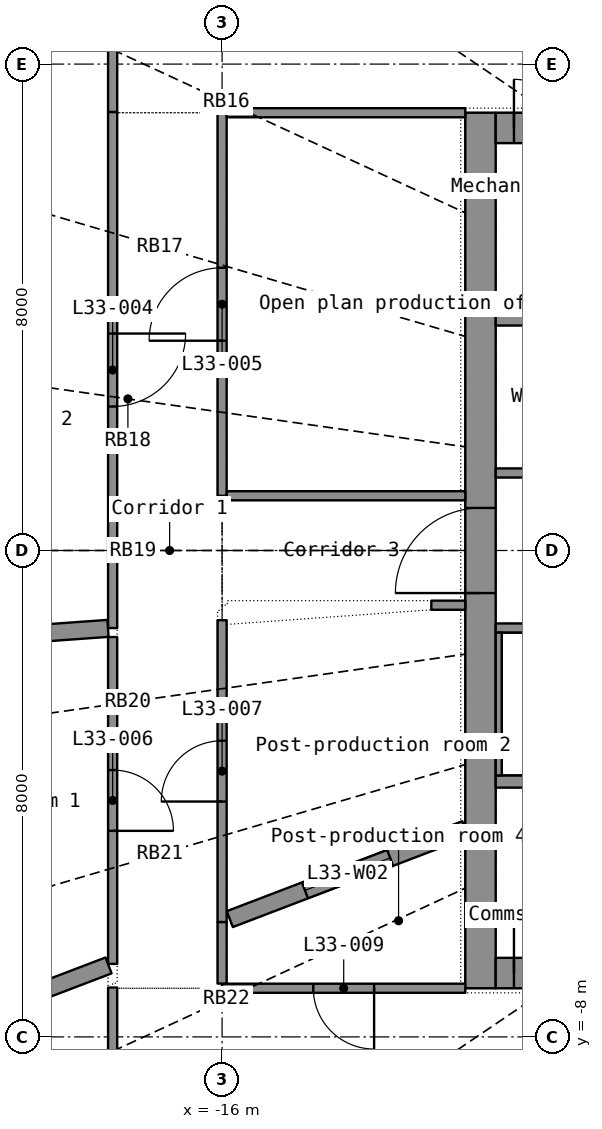
"""IFC4 building model, lengths in metres.
Left out: names, types, materials, properties, quantities, classifications, styles, units other than length and angle.
Written with IfcOpenShell. Run it as: python <this file> out.ifc"""

import sys

from ifc_helpers import new_model, si_unit, direction, frame, frame_2d, origin, place, context, subcontext, project, spatial, rectangle, extrude, element, fill, save


model = new_model("IFC4")
c1 = context("Model", 3, precision=1e-05, world=origin(), true_north=direction((0.0, 1.0)))
c2 = subcontext(c1, "Body", "Model", "MODEL_VIEW")
j1 = project(units=[si_unit("LENGTHUNIT", "METRE"), si_unit("PLANEANGLEUNIT", "RADIAN")], contexts=[c1])
p1 = place(None, origin())
s1 = spatial("IfcSite", under=j1, at=p1, CompositionType="ELEMENT")
p2 = place(p1, origin())
s2 = spatial("IfcBuilding", under=s1, at=p2, CompositionType="ELEMENT")
p3 = place(p2, frame((0.0, 0.0, 137.8)))
s3 = spatial("IfcBuildingStorey", under=s2, at=p3, CompositionType="ELEMENT", Elevation=137.8)
p4 = place(p3, frame((-11.75, -7.2, 0.0), z_axis=(0.0, 0.0, 1.0), x_axis=(0.0, 1.0, 0.0)))
e1 = element("IfcWall", 1, at=p4, inside=s3, PredefinedType="SHEAR", context=c2, shape_type="SweptSolid", body=[
    extrude(rectangle(XDim=14.4, YDim=0.5, at=frame_2d((7.2, 0.0))), origin(), (0.0, 0.0, 1.0), 3.3),
])
p5 = place(p4, frame((6.5, 0.0, 0.0)))
e2 = element("IfcOpeningElement", 2, at=p5, cuts=e1, PredefinedType="OPENING", context=c2, shape_type="SweptSolid", body=[
    extrude(rectangle(XDim=1.4, YDim=2.2, at=frame_2d((0.7, 1.1))), frame((0.0, 0.26, 0.0), z_axis=(0.0, -1.0, 0.0), x_axis=(1.0, 0.0, 0.0)), (0.0, 0.0, 1.0), 0.52),
])
p6 = place(p3, frame((-11.5, -6.95, 0.0), z_axis=(0.0, 0.0, 1.0), x_axis=(1.0, 0.0, 0.0)))
e3 = element("IfcWall", 3, at=p6, inside=s3, PredefinedType="SHEAR", context=c2, shape_type="SweptSolid", body=[
    extrude(rectangle(XDim=23.0, YDim=0.5, at=frame_2d((11.5, 0.0))), origin(), (0.0, 0.0, 1.0), 3.3),
])
p7 = place(p6, frame((1.95, 0.0, 0.0)))
e4 = element("IfcOpeningElement", 4, at=p7, cuts=e3, PredefinedType="OPENING", context=c2, shape_type="SweptSolid", body=[
    extrude(rectangle(XDim=1.1, YDim=2.2, at=frame_2d((0.55, 1.1))), frame((0.0, 0.26, 0.0), z_axis=(0.0, -1.0, 0.0), x_axis=(1.0, 0.0, 0.0)), (0.0, 0.0, 1.0), 0.52),
])
p8 = place(p6, frame((3.95, 0.0, 0.0)))
e5 = element("IfcOpeningElement", 5, at=p8, cuts=e3, PredefinedType="OPENING", context=c2, shape_type="SweptSolid", body=[
    extrude(rectangle(XDim=1.1, YDim=2.2, at=frame_2d((0.55, 1.1))), frame((0.0, 0.26, 0.0), z_axis=(0.0, -1.0, 0.0), x_axis=(1.0, 0.0, 0.0)), (0.0, 0.0, 1.0), 0.52),
])
p9 = place(p6, frame((5.95, 0.0, 0.0)))
e6 = element("IfcOpeningElement", 6, at=p9, cuts=e3, PredefinedType="OPENING", context=c2, shape_type="SweptSolid", body=[
    extrude(rectangle(XDim=1.1, YDim=2.2, at=frame_2d((0.55, 1.1))), frame((0.0, 0.26, 0.0), z_axis=(0.0, -1.0, 0.0), x_axis=(1.0, 0.0, 0.0)), (0.0, 0.0, 1.0), 0.52),
])
p10 = place(p6, frame((7.95, 0.0, 0.0)))
e7 = element("IfcOpeningElement", 7, at=p10, cuts=e3, PredefinedType="OPENING", context=c2, shape_type="SweptSolid", body=[
    extrude(rectangle(XDim=1.1, YDim=2.2, at=frame_2d((0.55, 1.1))), frame((0.0, 0.26, 0.0), z_axis=(0.0, -1.0, 0.0), x_axis=(1.0, 0.0, 0.0)), (0.0, 0.0, 1.0), 0.52),
])
p11 = place(p6, frame((9.95, 0.0, 0.0)))
e8 = element("IfcOpeningElement", 8, at=p11, cuts=e3, PredefinedType="OPENING", context=c2, shape_type="SweptSolid", body=[
    extrude(rectangle(XDim=1.1, YDim=2.2, at=frame_2d((0.55, 1.1))), frame((0.0, 0.26, 0.0), z_axis=(0.0, -1.0, 0.0), x_axis=(1.0, 0.0, 0.0)), (0.0, 0.0, 1.0), 0.52),
])
p12 = place(p6, frame((11.95, 0.0, 0.0)))
e9 = element("IfcOpeningElement", 9, at=p12, cuts=e3, PredefinedType="OPENING", context=c2, shape_type="SweptSolid", body=[
    extrude(rectangle(XDim=1.1, YDim=2.2, at=frame_2d((0.55, 1.1))), frame((0.0, 0.26, 0.0), z_axis=(0.0, -1.0, 0.0), x_axis=(1.0, 0.0, 0.0)), (0.0, 0.0, 1.0), 0.52),
])
p13 = place(p6, frame((13.95, 0.0, 0.0)))
e10 = element("IfcOpeningElement", 10, at=p13, cuts=e3, PredefinedType="OPENING", context=c2, shape_type="SweptSolid", body=[
    extrude(rectangle(XDim=1.1, YDim=2.2, at=frame_2d((0.55, 1.1))), frame((0.0, 0.26, 0.0), z_axis=(0.0, -1.0, 0.0), x_axis=(1.0, 0.0, 0.0)), (0.0, 0.0, 1.0), 0.52),
])
p14 = place(p6, frame((15.95, 0.0, 0.0)))
e11 = element("IfcOpeningElement", 11, at=p14, cuts=e3, PredefinedType="OPENING", context=c2, shape_type="SweptSolid", body=[
    extrude(rectangle(XDim=1.1, YDim=2.2, at=frame_2d((0.55, 1.1))), frame((0.0, 0.26, 0.0), z_axis=(0.0, -1.0, 0.0), x_axis=(1.0, 0.0, 0.0)), (0.0, 0.0, 1.0), 0.52),
])
p15 = place(p6, frame((19.95, 0.0, 0.0)))
e12 = element("IfcOpeningElement", 12, at=p15, cuts=e3, PredefinedType="OPENING", context=c2, shape_type="SweptSolid", body=[
    extrude(rectangle(XDim=1.1, YDim=2.2, at=frame_2d((0.55, 1.1))), frame((0.0, 0.26, 0.0), z_axis=(0.0, -1.0, 0.0), x_axis=(1.0, 0.0, 0.0)), (0.0, 0.0, 1.0), 0.52),
])
p16 = place(p6, frame((0.3, 0.0, 0.0)))
e13 = element("IfcOpeningElement", 13, at=p16, cuts=e3, PredefinedType="OPENING", context=c2, shape_type="SweptSolid", body=[
    extrude(rectangle(XDim=0.8, YDim=2.05, at=frame_2d((0.4, 1.025))), frame((0.0, 0.26, 0.0), z_axis=(0.0, -1.0, 0.0), x_axis=(1.0, 0.0, 0.0)), (0.0, 0.0, 1.0), 0.52),
])
p17 = place(p6, frame((21.9, 0.0, 0.0)))
e14 = element("IfcOpeningElement", 14, at=p17, cuts=e3, PredefinedType="OPENING", context=c2, shape_type="SweptSolid", body=[
    extrude(rectangle(XDim=0.8, YDim=2.05, at=frame_2d((0.4, 1.025))), frame((0.0, 0.26, 0.0), z_axis=(0.0, -1.0, 0.0), x_axis=(1.0, 0.0, 0.0)), (0.0, 0.0, 1.0), 0.52),
])
p18 = place(p3, frame((-11.5, 6.95, 0.0), z_axis=(0.0, 0.0, 1.0), x_axis=(1.0, 0.0, 0.0)))
e15 = element("IfcWall", 15, at=p18, inside=s3, PredefinedType="SHEAR", context=c2, shape_type="SweptSolid", body=[
    extrude(rectangle(XDim=23.0, YDim=0.5, at=frame_2d((11.5, 0.0))), origin(), (0.0, 0.0, 1.0), 3.3),
])
p19 = place(p18, frame((1.95, 0.0, 0.0)))
e16 = element("IfcOpeningElement", 16, at=p19, cuts=e15, PredefinedType="OPENING", context=c2, shape_type="SweptSolid", body=[
    extrude(rectangle(XDim=1.1, YDim=2.2, at=frame_2d((0.55, 1.1))), frame((0.0, 0.26, 0.0), z_axis=(0.0, -1.0, 0.0), x_axis=(1.0, 0.0, 0.0)), (0.0, 0.0, 1.0), 0.52),
])
p20 = place(p18, frame((10.05, 0.0, 0.0)))
e17 = element("IfcOpeningElement", 17, at=p20, cuts=e15, PredefinedType="OPENING", context=c2, shape_type="SweptSolid", body=[
    extrude(rectangle(XDim=0.9, YDim=2.1, at=frame_2d((0.45, 1.05))), frame((0.0, 0.26, 0.0), z_axis=(0.0, -1.0, 0.0), x_axis=(1.0, 0.0, 0.0)), (0.0, 0.0, 1.0), 0.52),
])
p21 = place(p18, frame((18.05, 0.0, 0.0)))
e18 = element("IfcOpeningElement", 18, at=p21, cuts=e15, PredefinedType="OPENING", context=c2, shape_type="SweptSolid", body=[
    extrude(rectangle(XDim=0.9, YDim=2.1, at=frame_2d((0.45, 1.05))), frame((0.0, 0.26, 0.0), z_axis=(0.0, -1.0, 0.0), x_axis=(1.0, 0.0, 0.0)), (0.0, 0.0, 1.0), 0.52),
])
p22 = place(p18, frame((0.3, 0.0, 0.0)))
e19 = element("IfcOpeningElement", 19, at=p22, cuts=e15, PredefinedType="OPENING", context=c2, shape_type="SweptSolid", body=[
    extrude(rectangle(XDim=0.8, YDim=2.05, at=frame_2d((0.4, 1.025))), frame((0.0, 0.26, 0.0), z_axis=(0.0, -1.0, 0.0), x_axis=(1.0, 0.0, 0.0)), (0.0, 0.0, 1.0), 0.52),
])
p23 = place(p18, frame((21.9, 0.0, 0.0)))
e20 = element("IfcOpeningElement", 20, at=p23, cuts=e15, PredefinedType="OPENING", context=c2, shape_type="SweptSolid", body=[
    extrude(rectangle(XDim=0.8, YDim=2.05, at=frame_2d((0.4, 1.025))), frame((0.0, 0.26, 0.0), z_axis=(0.0, -1.0, 0.0), x_axis=(1.0, 0.0, 0.0)), (0.0, 0.0, 1.0), 0.52),
])
for number, where, z_axis, x_axis in (
    (21, (-11.5, -3.8, 0.0), (0.0, 0.0, 1.0), (1.0, 0.0, 0.0)),
    (22, (-11.5, 3.8, 0.0), (0.0, 0.0, 1.0), (1.0, 0.0, 0.0)),
):
    element("IfcWall", number, at=place(p3, frame(where, z_axis=z_axis, x_axis=x_axis)), inside=s3, PredefinedType="SHEAR", context=c2, shape_type="SweptSolid", body=[
        extrude(rectangle(XDim=23.0, YDim=0.2, at=frame_2d((11.5, 0.0))), origin(), (0.0, 0.0, 1.0), 3.3),
    ])
p24 = place(p3, frame((-11.5, -1.275, 0.0), z_axis=(0.0, 0.0, 1.0), x_axis=(1.0, 0.0, 0.0)))
e23 = element("IfcWall", 23, at=p24, inside=s3, PredefinedType="SHEAR", context=c2, shape_type="SweptSolid", body=[
    extrude(rectangle(XDim=8.5, YDim=0.15, at=frame_2d((4.25, 0.0))), origin(), (0.0, 0.0, 1.0), 3.3),
])
p25 = place(p24, frame((5.35, 0.0, 0.0)))
e24 = element("IfcOpeningElement", 24, at=p25, cuts=e23, PredefinedType="OPENING", context=c2, shape_type="SweptSolid", body=[
    extrude(rectangle(XDim=1.1, YDim=2.15, at=frame_2d((0.55, 1.075))), frame((0.0, 0.085, 0.0), z_axis=(0.0, -1.0, 0.0), x_axis=(1.0, 0.0, 0.0)), (0.0, 0.0, 1.0), 0.17),
])
p26 = place(p24, frame((7.15, 0.0, 0.0)))
e25 = element("IfcOpeningElement", 25, at=p26, cuts=e23, PredefinedType="OPENING", context=c2, shape_type="SweptSolid", body=[
    extrude(rectangle(XDim=0.9, YDim=2.1, at=frame_2d((0.45, 1.05))), frame((0.0, 0.085, 0.0), z_axis=(0.0, -1.0, 0.0), x_axis=(1.0, 0.0, 0.0)), (0.0, 0.0, 1.0), 0.17),
])
p27 = place(p3, frame((-11.5, 1.275, 0.0), z_axis=(0.0, 0.0, 1.0), x_axis=(1.0, 0.0, 0.0)))
e26 = element("IfcWall", 26, at=p27, inside=s3, PredefinedType="PARTITIONING", context=c2, shape_type="SweptSolid", body=[
    extrude(rectangle(XDim=8.5, YDim=0.15, at=frame_2d((4.25, 0.0))), origin(), (0.0, 0.0, 1.0), 3.3),
])
p28 = place(p27, frame((0.782, 0.0, 0.0)))
e27 = element("IfcOpeningElement", 27, at=p28, cuts=e26, PredefinedType="OPENING", context=c2, shape_type="SweptSolid", body=[
    extrude(rectangle(XDim=0.85, YDim=2.1, at=frame_2d((0.425, 1.05))), frame((0.0, 0.085, 0.0), z_axis=(0.0, -1.0, 0.0), x_axis=(1.0, 0.0, 0.0)), (0.0, 0.0, 1.0), 0.17),
])
p29 = place(p27, frame((3.347, 0.0, 0.0)))
e28 = element("IfcOpeningElement", 28, at=p29, cuts=e26, PredefinedType="OPENING", context=c2, shape_type="SweptSolid", body=[
    extrude(rectangle(XDim=0.85, YDim=2.1, at=frame_2d((0.425, 1.05))), frame((0.0, 0.085, 0.0), z_axis=(0.0, -1.0, 0.0), x_axis=(1.0, 0.0, 0.0)), (0.0, 0.0, 1.0), 0.17),
])
p30 = place(p27, frame((5.485, 0.0, 0.0)))
e29 = element("IfcOpeningElement", 29, at=p30, cuts=e26, PredefinedType="OPENING", context=c2, shape_type="SweptSolid", body=[
    extrude(rectangle(XDim=0.9, YDim=2.1, at=frame_2d((0.45, 1.05))), frame((0.0, 0.085, 0.0), z_axis=(0.0, -1.0, 0.0), x_axis=(1.0, 0.0, 0.0)), (0.0, 0.0, 1.0), 0.17),
])
p31 = place(p27, frame((7.245, 0.0, 0.0)))
e30 = element("IfcOpeningElement", 30, at=p31, cuts=e26, PredefinedType="OPENING", context=c2, shape_type="SweptSolid", body=[
    extrude(rectangle(XDim=0.9, YDim=2.1, at=frame_2d((0.45, 1.05))), frame((0.0, 0.085, 0.0), z_axis=(0.0, -1.0, 0.0), x_axis=(1.0, 0.0, 0.0)), (0.0, 0.0, 1.0), 0.17),
])
p32 = place(p3, frame((-11.45, -3.7, 0.0), z_axis=(0.0, 0.0, 1.0), x_axis=(0.0, 1.0, 0.0)))
e31 = element("IfcWall", 31, at=p32, inside=s3, PredefinedType="SHEAR", context=c2, shape_type="SweptSolid", body=[
    extrude(rectangle(XDim=2.35, YDim=0.1, at=frame_2d((1.175, 0.0))), origin(), (0.0, 0.0, 1.0), 3.3),
])
p33 = place(p3, frame((-17.8, 7.212, 0.0), z_axis=(0.0, 0.0, 1.0), x_axis=(0.0, -1.0, 0.0)))
e32 = element("IfcWall", 32, at=p33, inside=s3, PredefinedType="PARTITIONING", context=c2, shape_type="SweptSolid", body=[
    extrude(rectangle(XDim=8.488, YDim=0.15, at=frame_2d((4.244, 0.0))), origin(), (0.0, 0.0, 1.0), 2.4),
])
p34 = place(p33, frame((3.644, 0.0, 0.0)))
e33 = element("IfcOpeningElement", 33, at=p34, cuts=e32, PredefinedType="OPENING", context=c2, shape_type="SweptSolid", body=[
    extrude(rectangle(XDim=1.2, YDim=2.2, at=frame_2d((0.6, 1.1))), frame((0.0, 0.085, 0.0), z_axis=(0.0, -1.0, 0.0), x_axis=(1.0, 0.0, 0.0)), (0.0, 0.0, 1.0), 0.17),
])
p35 = place(p3, frame((-24.622, -1.764, 0.0), z_axis=(0.0, 0.0, 1.0), x_axis=(0.997442181, 0.071477941, 0.0)))
e34 = element("IfcWall", 34, at=p35, inside=s3, PredefinedType="PARTITIONING", context=c2, shape_type="SweptSolid", body=[
    extrude(rectangle(XDim=6.763, YDim=0.28, at=frame_2d((3.381, 0.0))), origin(), (0.0, 0.0, 1.0), 2.4),
])
p36 = place(p35, frame((2.632, 0.0, 1.0)))
e35 = element("IfcOpeningElement", 35, at=p36, cuts=e34, PredefinedType="OPENING", context=c2, shape_type="SweptSolid", body=[
    extrude(rectangle(XDim=1.5, YDim=1.2, at=frame_2d((0.75, 0.6))), frame((0.0, 0.15, 0.0), z_axis=(0.0, -1.0, 0.0), x_axis=(1.0, 0.0, 0.0)), (0.0, 0.0, 1.0), 0.3),
])
p37 = place(p3, frame((-16.0, 0.9, 0.0), z_axis=(0.0, 0.0, 1.0), x_axis=(0.0, 1.0, 0.0)))
e36 = element("IfcWall", 36, at=p37, inside=s3, PredefinedType="PARTITIONING", context=c2, shape_type="SweptSolid", body=[
    extrude(rectangle(XDim=6.3, YDim=0.15, at=frame_2d((3.15, 0.0))), origin(), (0.0, 0.0, 1.0), 2.4),
])
p38 = place(p37, frame((2.55, 0.0, 0.0)))
e37 = element("IfcOpeningElement", 37, at=p38, cuts=e36, PredefinedType="OPENING", context=c2, shape_type="SweptSolid", body=[
    extrude(rectangle(XDim=1.2, YDim=2.2, at=frame_2d((0.6, 1.1))), frame((0.0, 0.085, 0.0), z_axis=(0.0, -1.0, 0.0), x_axis=(1.0, 0.0, 0.0)), (0.0, 0.0, 1.0), 0.17),
])
p39 = place(p3, frame((-17.8, -1.423, 0.0), z_axis=(0.0, 0.0, 1.0), x_axis=(0.0, -1.0, 0.0)))
e38 = element("IfcWall", 38, at=p39, inside=s3, PredefinedType="PARTITIONING", context=c2, shape_type="SweptSolid", body=[
    extrude(rectangle(XDim=5.375, YDim=0.15, at=frame_2d((2.688, 0.0))), origin(), (0.0, 0.0, 1.0), 2.4),
])
p40 = place(p39, frame((2.188, 0.0, 0.0)))
e39 = element("IfcOpeningElement", 39, at=p40, cuts=e38, PredefinedType="OPENING", context=c2, shape_type="SweptSolid", body=[
    extrude(rectangle(XDim=1.0, YDim=2.2, at=frame_2d((0.5, 1.1))), frame((0.0, 0.085, 0.0), z_axis=(0.0, -1.0, 0.0), x_axis=(1.0, 0.0, 0.0)), (0.0, 0.0, 1.0), 0.17),
])
p41 = place(p3, frame((-16.0, -6.111, 0.0), z_axis=(0.0, 0.0, 1.0), x_axis=(0.0, 1.0, 0.0)))
e40 = element("IfcWall", 40, at=p41, inside=s3, PredefinedType="PARTITIONING", context=c2, shape_type="SweptSolid", body=[
    extrude(rectangle(XDim=4.965, YDim=0.15, at=frame_2d((2.482, 0.0))), origin(), (0.0, 0.0, 1.0), 2.4),
])
p42 = place(p41, frame((1.982, 0.0, 0.0)))
e41 = element("IfcOpeningElement", 41, at=p42, cuts=e40, PredefinedType="OPENING", context=c2, shape_type="SweptSolid", body=[
    extrude(rectangle(XDim=1.0, YDim=2.2, at=frame_2d((0.5, 1.1))), frame((0.0, 0.085, 0.0), z_axis=(0.0, -1.0, 0.0), x_axis=(1.0, 0.0, 0.0)), (0.0, 0.0, 1.0), 0.17),
])
p43 = place(p3, frame((-22.396, -8.554, 0.0), z_axis=(0.0, 0.0, 1.0), x_axis=(0.934184204, 0.356791077, 0.0)))
e42 = element("IfcWall", 42, at=p43, inside=s3, PredefinedType="PARTITIONING", context=c2, shape_type="SweptSolid", body=[
    extrude(rectangle(XDim=4.847, YDim=0.28, at=frame_2d((2.424, 0.0))), origin(), (0.0, 0.0, 1.0), 2.4),
])
p44 = place(p3, frame((-15.873, -6.063, 0.0), z_axis=(0.0, 0.0, 1.0), x_axis=(0.934170215, 0.356827703, 0.0)))
e43 = element("IfcWall", 43, at=p44, inside=s3, PredefinedType="PARTITIONING", context=c2, shape_type="SweptSolid", body=[
    extrude(rectangle(XDim=4.146, YDim=0.28, at=frame_2d((2.073, 0.0))), origin(), (0.0, 0.0, 1.0), 2.4),
])
p45 = place(p44, frame((1.323, 0.0, 1.0)))
e44 = element("IfcOpeningElement", 44, at=p45, cuts=e43, PredefinedType="OPENING", context=c2, shape_type="SweptSolid", body=[
    extrude(rectangle(XDim=1.5, YDim=1.2, at=frame_2d((0.75, 0.6))), frame((0.0, 0.15, 0.0), z_axis=(0.0, -1.0, 0.0), x_axis=(1.0, 0.0, 0.0)), (0.0, 0.0, 1.0), 0.3),
])
p46 = place(p3, frame((-15.923, 7.2, 0.0), z_axis=(0.0, 0.0, 1.0), x_axis=(1.0, 0.0, 0.0)))
e45 = element("IfcWall", 45, at=p46, inside=s3, PredefinedType="PARTITIONING", context=c2, shape_type="SweptSolid", body=[
    extrude(rectangle(XDim=3.923, YDim=0.15, at=frame_2d((1.961, 0.0))), origin(), (0.0, 0.0, 1.0), 2.4),
])
p47 = place(p3, frame((-12.0, -7.2, 0.0), z_axis=(0.0, 0.0, 1.0), x_axis=(-1.0, 0.0, 0.0)))
e46 = element("IfcWall", 46, at=p47, inside=s3, PredefinedType="PARTITIONING", context=c2, shape_type="SweptSolid", body=[
    extrude(rectangle(XDim=4.0, YDim=0.15, at=frame_2d((2.0, 0.0))), origin(), (0.0, 0.0, 1.0), 2.4),
])
p48 = place(p47, frame((1.5, 0.0, 0.0)))
e47 = element("IfcOpeningElement", 47, at=p48, cuts=e46, PredefinedType="OPENING", context=c2, shape_type="SweptSolid", body=[
    extrude(rectangle(XDim=1.0, YDim=2.2, at=frame_2d((0.5, 1.1))), frame((0.0, 0.085, 0.0), z_axis=(0.0, -1.0, 0.0), x_axis=(1.0, 0.0, 0.0)), (0.0, 0.0, 1.0), 0.17),
])
p49 = place(p3, frame((-12.0, 0.9, 0.0), z_axis=(0.0, 0.0, 1.0), x_axis=(-1.0, 0.0, 0.0)))
e48 = element("IfcWall", 48, at=p49, inside=s3, PredefinedType="PARTITIONING", context=c2, shape_type="SweptSolid", body=[
    extrude(rectangle(XDim=3.923, YDim=0.15, at=frame_2d((1.961, 0.0))), origin(), (0.0, 0.0, 1.0), 2.4),
])
p50 = place(p3, frame((-17.8, -7.188, 0.0), z_axis=(0.0, 0.0, 1.0), x_axis=(0.0, -1.0, 0.0)))
e49 = element("IfcWall", 49, at=p50, inside=s3, PredefinedType="PARTITIONING", context=c2, shape_type="SweptSolid", body=[
    extrude(rectangle(XDim=3.535, YDim=0.15, at=frame_2d((1.768, 0.0))), origin(), (0.0, 0.0, 1.0), 2.4),
])
p51 = place(p3, frame((-17.8, 10.723, 0.0), z_axis=(0.0, 0.0, 1.0), x_axis=(0.0, -1.0, 0.0)))
e50 = element("IfcWall", 50, at=p51, inside=s3, PredefinedType="PARTITIONING", context=c2, shape_type="SweptSolid", body=[
    extrude(rectangle(XDim=3.51, YDim=0.15, at=frame_2d((1.755, 0.0))), origin(), (0.0, 0.0, 1.0), 2.4),
])
p52 = place(p3, frame((-16.0, -7.123, 0.0), z_axis=(0.0, 0.0, 1.0), x_axis=(0.0, 1.0, 0.0)))
e51 = element("IfcWall", 51, at=p52, inside=s3, PredefinedType="PARTITIONING", context=c2, shape_type="SweptSolid", body=[
    extrude(rectangle(XDim=1.011, YDim=0.15, at=frame_2d((0.505, 0.0))), origin(), (0.0, 0.0, 1.0), 2.4),
])
p53 = place(p3, frame((-12.559, -0.9, 0.0), z_axis=(0.0, 0.0, 1.0), x_axis=(1.0, 0.0, 0.0)))
e52 = element("IfcWall", 52, at=p53, inside=s3, PredefinedType="PARTITIONING", context=c2, shape_type="SweptSolid", body=[
    extrude(rectangle(XDim=0.559, YDim=0.15, at=frame_2d((0.279, 0.0))), origin(), (0.0, 0.0, 1.0), 2.4),
])
p54 = place(p16, origin())
e53 = element("IfcDoor", 53, at=p54, inside=s3, OperationType="SINGLE_SWING_LEFT", PredefinedType="DOOR", context=c2, shape_type="SweptSolid", body=[
    extrude(rectangle(XDim=0.8, YDim=2.05, at=frame_2d((0.4, 1.025))), frame((0.0, 0.025, 0.0), z_axis=(0.0, -1.0, 0.0), x_axis=(1.0, 0.0, 0.0)), (0.0, 0.0, 1.0), 0.05),
])
fill(e13, e53)
p55 = place(p22, origin())
e54 = element("IfcDoor", 54, at=p55, inside=s3, OperationType="SINGLE_SWING_LEFT", PredefinedType="DOOR", context=c2, shape_type="SweptSolid", body=[
    extrude(rectangle(XDim=0.8, YDim=2.05, at=frame_2d((0.4, 1.025))), frame((0.0, 0.025, 0.0), z_axis=(0.0, -1.0, 0.0), x_axis=(1.0, 0.0, 0.0)), (0.0, 0.0, 1.0), 0.05),
])
fill(e19, e54)
p56 = place(p5, origin())
e55 = element("IfcDoor", 55, at=p56, inside=s3, OperationType="DOUBLE_DOOR_SINGLE_SWING", PredefinedType="DOOR", context=c2, shape_type="SweptSolid", body=[
    extrude(rectangle(XDim=1.4, YDim=2.2, at=frame_2d((0.7, 1.1))), frame((0.0, 0.025, 0.0), z_axis=(0.0, -1.0, 0.0), x_axis=(1.0, 0.0, 0.0)), (0.0, 0.0, 1.0), 0.05),
])
fill(e2, e55)
p57 = place(p34, origin())
e56 = element("IfcDoor", 56, at=p57, inside=s3, OperationType="DOUBLE_DOOR_SINGLE_SWING", PredefinedType="DOOR", context=c2, shape_type="SweptSolid", body=[
    extrude(rectangle(XDim=1.2, YDim=2.2, at=frame_2d((0.6, 1.1))), frame((0.0, 0.025, 0.0), z_axis=(0.0, -1.0, 0.0), x_axis=(1.0, 0.0, 0.0)), (0.0, 0.0, 1.0), 0.05),
])
fill(e33, e56)
p58 = place(p38, origin())
e57 = element("IfcDoor", 57, at=p58, inside=s3, OperationType="DOUBLE_DOOR_SINGLE_SWING", PredefinedType="DOOR", context=c2, shape_type="SweptSolid", body=[
    extrude(rectangle(XDim=1.2, YDim=2.2, at=frame_2d((0.6, 1.1))), frame((0.0, 0.025, 0.0), z_axis=(0.0, -1.0, 0.0), x_axis=(1.0, 0.0, 0.0)), (0.0, 0.0, 1.0), 0.05),
])
fill(e37, e57)
p59 = place(p40, origin())
e58 = element("IfcDoor", 58, at=p59, inside=s3, OperationType="SINGLE_SWING_RIGHT", PredefinedType="DOOR", context=c2, shape_type="SweptSolid", body=[
    extrude(rectangle(XDim=1.0, YDim=2.2, at=frame_2d((0.5, 1.1))), frame((0.0, 0.025, 0.0), z_axis=(0.0, -1.0, 0.0), x_axis=(1.0, 0.0, 0.0)), (0.0, 0.0, 1.0), 0.05),
])
fill(e39, e58)
p60 = place(p42, origin())
e59 = element("IfcDoor", 59, at=p60, inside=s3, OperationType="SINGLE_SWING_LEFT", PredefinedType="DOOR", context=c2, shape_type="SweptSolid", body=[
    extrude(rectangle(XDim=1.0, YDim=2.2, at=frame_2d((0.5, 1.1))), frame((0.0, 0.025, 0.0), z_axis=(0.0, -1.0, 0.0), x_axis=(1.0, 0.0, 0.0)), (0.0, 0.0, 1.0), 0.05),
])
fill(e41, e59)
p61 = place(p48, origin())
e60 = element("IfcDoor", 60, at=p61, inside=s3, OperationType="SINGLE_SWING_LEFT", PredefinedType="DOOR", context=c2, shape_type="SweptSolid", body=[
    extrude(rectangle(XDim=1.0, YDim=2.2, at=frame_2d((0.5, 1.1))), frame((0.0, 0.025, 0.0), z_axis=(0.0, -1.0, 0.0), x_axis=(1.0, 0.0, 0.0)), (0.0, 0.0, 1.0), 0.05),
])
fill(e47, e60)
p62 = place(p45, origin())
e61 = element("IfcWindow", 61, at=p62, inside=s3, PartitioningType="SINGLE_PANEL", PredefinedType="WINDOW", context=c2, shape_type="SweptSolid", body=[
    extrude(rectangle(XDim=1.5, YDim=1.2, at=frame_2d((0.75, 0.6))), frame((0.0, 0.03, 0.0), z_axis=(0.0, -1.0, 0.0), x_axis=(1.0, 0.0, 0.0)), (0.0, 0.0, 1.0), 0.06),
])
fill(e44, e61)
save(model, sys.argv[1])
